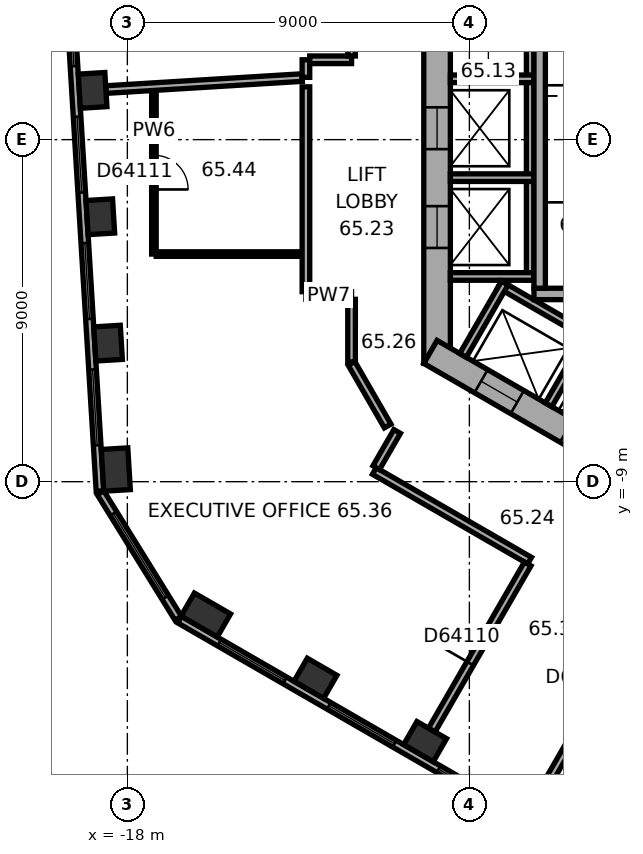
"""IFC4 building model, lengths in metres.
Left out: names, types, materials, properties, quantities, classifications, styles, units other than length and angle.
Written with IfcOpenShell. Run it as: python <this file> out.ifc"""

import sys

from ifc_helpers import new_model, si_unit, direction, frame, frame_2d, origin, origin_2d, place, context, subcontext, project, spatial, rectangle, extrude, element, fill, save


model = new_model("IFC4")
c1 = context("Model", 3, precision=1e-05, world=origin(), true_north=direction((0.0, 1.0)))
c2 = subcontext(c1, "Body", "Model", "MODEL_VIEW")
j1 = project(units=[si_unit("LENGTHUNIT", "METRE"), si_unit("PLANEANGLEUNIT", "RADIAN")], contexts=[c1])
p1 = place(None, origin())
s1 = spatial("IfcSite", under=j1, at=p1, CompositionType="ELEMENT")
p2 = place(p1, origin())
s2 = spatial("IfcBuilding", under=s1, at=p2, CompositionType="ELEMENT")
p3 = place(p2, frame((0.0, 0.0, 263.5)))
s3 = spatial("IfcBuildingStorey", under=s2, at=p3, CompositionType="ELEMENT", Elevation=263.5)
for number, where, z_axis, x_axis in (
    (1, (-18.914, 1.296, 0.0), (0.0, 0.0, 1.0), (0.061, -0.998, 0.0)),
    (2, (-18.711, -2.03, 0.0), (0.0, 0.0, 1.0), (0.061, -0.998, 0.0)),
    (3, (-18.508, -5.355, 0.0), (0.0, 0.0, 1.0), (0.061, -0.998, 0.0)),
):
    element("IfcColumn", number, at=place(p3, frame(where, z_axis=z_axis, x_axis=x_axis)), inside=s3, PredefinedType="COLUMN", context=c2, shape_type="SweptSolid", body=[
        extrude(rectangle(XDim=0.9, YDim=0.7, at=origin_2d()), origin(), (0.0, 0.0, 1.0), 3.7),
    ])
for number, where, z_axis, x_axis in (
    (4, (-18.304, -8.68, 0.0), (0.0, 0.0, 1.0), (0.061, -0.998, 0.0)),
    (5, (-15.936, -12.508, 0.0), (0.0, 0.0, 1.0), (0.866, -0.5, 0.0)),
):
    element("IfcColumn", number, at=place(p3, frame(where, z_axis=z_axis, x_axis=x_axis)), inside=s3, PredefinedType="COLUMN", context=c2, shape_type="SweptSolid", body=[
        extrude(rectangle(XDim=1.1, YDim=0.7, at=origin_2d()), origin(), (0.0, 0.0, 1.0), 3.7),
    ])
for number, where, z_axis, x_axis in (
    (6, (-13.05, -14.174, 0.0), (0.0, 0.0, 1.0), (0.866, -0.5, 0.0)),
    (7, (-10.165, -15.84, 0.0), (0.0, 0.0, 1.0), (0.866, -0.5, 0.0)),
):
    element("IfcColumn", number, at=place(p3, frame(where, z_axis=z_axis, x_axis=x_axis)), inside=s3, PredefinedType="COLUMN", context=c2, shape_type="SweptSolid", body=[
        extrude(rectangle(XDim=0.9, YDim=0.7, at=origin_2d()), origin(), (0.0, 0.0, 1.0), 3.7),
    ])
p4 = place(p3, frame((-9.85, 5.889, 0.0), z_axis=(0.0, 0.0, 1.0), x_axis=(0.0, -1.0, 0.0)))
e8 = element("IfcWall", 8, at=p4, inside=s3, PredefinedType="SHEAR", context=c2, shape_type="SweptSolid", body=[
    extrude(rectangle(XDim=11.778, YDim=0.7, at=frame_2d((5.889, 0.0))), origin(), (0.0, 0.0, 1.0), 3.7),
])
p5 = place(p4, frame((5.039, 0.0, 0.0)))
e9 = element("IfcOpeningElement", 9, at=p5, cuts=e8, PredefinedType="OPENING", context=c2, shape_type="SweptSolid", body=[
    extrude(rectangle(XDim=1.1, YDim=2.1, at=frame_2d((0.55, 1.05))), frame((0.0, 0.36, 0.0), z_axis=(0.0, -1.0, 0.0), x_axis=(1.0, 0.0, 0.0)), (0.0, 0.0, 1.0), 0.72),
])
p6 = place(p4, frame((7.639, 0.0, 0.0)))
e10 = element("IfcOpeningElement", 10, at=p6, cuts=e8, PredefinedType="OPENING", context=c2, shape_type="SweptSolid", body=[
    extrude(rectangle(XDim=1.1, YDim=2.1, at=frame_2d((0.55, 1.05))), frame((0.0, 0.36, 0.0), z_axis=(0.0, -1.0, 0.0), x_axis=(1.0, 0.0, 0.0)), (0.0, 0.0, 1.0), 0.72),
])
p7 = place(p3, frame((-10.025, -5.586, 0.0), z_axis=(0.0, 0.0, 1.0), x_axis=(0.866026453023, -0.499998182661, 0.0)))
e11 = element("IfcWall", 11, at=p7, inside=s3, PredefinedType="SHEAR", context=c2, shape_type="SweptSolid", body=[
    extrude(rectangle(XDim=11.778, YDim=0.7, at=frame_2d((5.889, 0.0))), origin(), (0.0, 0.0, 1.0), 3.7),
])
p8 = place(p7, frame((6.089, 0.0, 0.0)))
e12 = element("IfcOpeningElement", 12, at=p8, cuts=e11, PredefinedType="OPENING", context=c2, shape_type="SweptSolid", body=[
    extrude(rectangle(XDim=1.5, YDim=2.1, at=frame_2d((0.75, 1.05))), frame((0.0, 0.36, 0.0), z_axis=(0.0, -1.0, 0.0), x_axis=(1.0, 0.0, 0.0)), (0.0, 0.0, 1.0), 0.72),
])
p9 = place(p7, frame((1.539, 0.0, 0.0)))
e13 = element("IfcOpeningElement", 13, at=p9, cuts=e11, PredefinedType="OPENING", context=c2, shape_type="SweptSolid", body=[
    extrude(rectangle(XDim=1.1, YDim=2.1, at=frame_2d((0.55, 1.05))), frame((0.0, 0.36, 0.0), z_axis=(0.0, -1.0, 0.0), x_axis=(1.0, 0.0, 0.0)), (0.0, 0.0, 1.0), 0.72),
])
p10 = place(p7, frame((4.139, 0.0, 0.0)))
e14 = element("IfcOpeningElement", 14, at=p10, cuts=e11, PredefinedType="OPENING", context=c2, shape_type="SweptSolid", body=[
    extrude(rectangle(XDim=1.1, YDim=2.1, at=frame_2d((0.55, 1.05))), frame((0.0, 0.36, 0.0), z_axis=(0.0, -1.0, 0.0), x_axis=(1.0, 0.0, 0.0)), (0.0, 0.0, 1.0), 0.72),
])
p11 = place(p3, frame((-19.803, 8.454, 0.0), z_axis=(0.0, 0.0, 1.0), x_axis=(0.061036717565, -0.998135521414, 0.0)))
e15 = element("IfcWall", 15, at=p11, inside=s3, PredefinedType="STANDARD", context=c2, shape_type="SweptSolid", body=[
    extrude(rectangle(XDim=17.731, YDim=0.2, at=frame_2d((8.866, 0.0))), origin(), (0.0, 0.0, 1.0), 3.7),
])
p12 = place(p11, frame((1.202, 0.0, 0.9)))
e16 = element("IfcOpeningElement", 16, at=p12, cuts=e15, PredefinedType="OPENING", context=c2, shape_type="SweptSolid", body=[
    extrude(rectangle(XDim=2.0, YDim=2.0, at=frame_2d((1.0, 1.0))), frame((0.0, 0.11, 0.0), z_axis=(0.0, -1.0, 0.0), x_axis=(1.0, 0.0, 0.0)), (0.0, 0.0, 1.0), 0.22),
])
p13 = place(p11, frame((4.533, 0.0, 0.9)))
e17 = element("IfcOpeningElement", 17, at=p13, cuts=e15, PredefinedType="OPENING", context=c2, shape_type="SweptSolid", body=[
    extrude(rectangle(XDim=2.0, YDim=2.0, at=frame_2d((1.0, 1.0))), frame((0.0, 0.11, 0.0), z_axis=(0.0, -1.0, 0.0), x_axis=(1.0, 0.0, 0.0)), (0.0, 0.0, 1.0), 0.22),
])
p14 = place(p11, frame((7.865, 0.0, 0.9)))
e18 = element("IfcOpeningElement", 18, at=p14, cuts=e15, PredefinedType="OPENING", context=c2, shape_type="SweptSolid", body=[
    extrude(rectangle(XDim=2.0, YDim=2.0, at=frame_2d((1.0, 1.0))), frame((0.0, 0.11, 0.0), z_axis=(0.0, -1.0, 0.0), x_axis=(1.0, 0.0, 0.0)), (0.0, 0.0, 1.0), 0.22),
])
p15 = place(p11, frame((11.197, 0.0, 0.9)))
e19 = element("IfcOpeningElement", 19, at=p15, cuts=e15, PredefinedType="OPENING", context=c2, shape_type="SweptSolid", body=[
    extrude(rectangle(XDim=2.0, YDim=2.0, at=frame_2d((1.0, 1.0))), frame((0.0, 0.11, 0.0), z_axis=(0.0, -1.0, 0.0), x_axis=(1.0, 0.0, 0.0)), (0.0, 0.0, 1.0), 0.22),
])
p16 = place(p11, frame((14.528, 0.0, 0.9)))
e20 = element("IfcOpeningElement", 20, at=p16, cuts=e15, PredefinedType="OPENING", context=c2, shape_type="SweptSolid", body=[
    extrude(rectangle(XDim=2.0, YDim=2.0, at=frame_2d((1.0, 1.0))), frame((0.0, 0.11, 0.0), z_axis=(0.0, -1.0, 0.0), x_axis=(1.0, 0.0, 0.0)), (0.0, 0.0, 1.0), 0.22),
])
p17 = place(p3, frame((-18.706, -9.291, 0.0), z_axis=(0.0, 0.0, 1.0), x_axis=(0.526209683648, -0.850354848775, 0.0)))
e21 = element("IfcWall", 21, at=p17, inside=s3, PredefinedType="STANDARD", context=c2, shape_type="SweptSolid", body=[
    extrude(rectangle(XDim=3.886, YDim=0.2, at=frame_2d((1.943, 0.0))), origin(), (0.0, 0.0, 1.0), 3.7),
])
p18 = place(p17, frame((0.643, 0.0, 0.9)))
e22 = element("IfcOpeningElement", 22, at=p18, cuts=e21, PredefinedType="OPENING", context=c2, shape_type="SweptSolid", body=[
    extrude(rectangle(XDim=2.6, YDim=2.0, at=frame_2d((1.3, 1.0))), frame((0.0, 0.11, 0.0), z_axis=(0.0, -1.0, 0.0), x_axis=(1.0, 0.0, 0.0)), (0.0, 0.0, 1.0), 0.22),
])
p19 = place(p3, frame((-16.626, -12.629, 0.0), z_axis=(0.0, 0.0, 1.0), x_axis=(0.866026460444, -0.499998169808, 0.0)))
e23 = element("IfcWall", 23, at=p19, inside=s3, PredefinedType="STANDARD", context=c2, shape_type="SweptSolid", body=[
    extrude(rectangle(XDim=17.731, YDim=0.2, at=frame_2d((8.866, 0.0))), origin(), (0.0, 0.0, 1.0), 3.7),
])
p20 = place(p19, frame((1.203, 0.0, 0.9)))
e24 = element("IfcOpeningElement", 24, at=p20, cuts=e23, PredefinedType="OPENING", context=c2, shape_type="SweptSolid", body=[
    extrude(rectangle(XDim=2.0, YDim=2.0, at=frame_2d((1.0, 1.0))), frame((0.0, 0.11, 0.0), z_axis=(0.0, -1.0, 0.0), x_axis=(1.0, 0.0, 0.0)), (0.0, 0.0, 1.0), 0.22),
])
p21 = place(p19, frame((4.535, 0.0, 0.9)))
e25 = element("IfcOpeningElement", 25, at=p21, cuts=e23, PredefinedType="OPENING", context=c2, shape_type="SweptSolid", body=[
    extrude(rectangle(XDim=2.0, YDim=2.0, at=frame_2d((1.0, 1.0))), frame((0.0, 0.11, 0.0), z_axis=(0.0, -1.0, 0.0), x_axis=(1.0, 0.0, 0.0)), (0.0, 0.0, 1.0), 0.22),
])
p22 = place(p19, frame((7.867, 0.0, 0.9)))
e26 = element("IfcOpeningElement", 26, at=p22, cuts=e23, PredefinedType="OPENING", context=c2, shape_type="SweptSolid", body=[
    extrude(rectangle(XDim=2.0, YDim=2.0, at=frame_2d((1.0, 1.0))), frame((0.0, 0.11, 0.0), z_axis=(0.0, -1.0, 0.0), x_axis=(1.0, 0.0, 0.0)), (0.0, 0.0, 1.0), 0.22),
])
p23 = place(p19, frame((11.198, 0.0, 0.9)))
e27 = element("IfcOpeningElement", 27, at=p23, cuts=e23, PredefinedType="OPENING", context=c2, shape_type="SweptSolid", body=[
    extrude(rectangle(XDim=2.0, YDim=2.0, at=frame_2d((1.0, 1.0))), frame((0.0, 0.11, 0.0), z_axis=(0.0, -1.0, 0.0), x_axis=(1.0, 0.0, 0.0)), (0.0, 0.0, 1.0), 0.22),
])
p24 = place(p19, frame((14.53, 0.0, 0.9)))
e28 = element("IfcOpeningElement", 28, at=p24, cuts=e23, PredefinedType="OPENING", context=c2, shape_type="SweptSolid", body=[
    extrude(rectangle(XDim=2.0, YDim=2.0, at=frame_2d((1.0, 1.0))), frame((0.0, 0.11, 0.0), z_axis=(0.0, -1.0, 0.0), x_axis=(1.0, 0.0, 0.0)), (0.0, 0.0, 1.0), 0.22),
])
p25 = place(p3, frame((-7.4, 4.3, 0.0), z_axis=(0.0, 0.0, 1.0), x_axis=(0.0, -1.0, 0.0)))
e29 = element("IfcWall", 29, at=p25, inside=s3, PredefinedType="PARTITIONING", context=c2, shape_type="SweptSolid", body=[
    extrude(rectangle(XDim=8.0, YDim=0.2, at=frame_2d((4.0, 0.0))), origin(), (0.0, 0.0, 1.0), 3.42),
])
for number, where, z_axis, x_axis in (
    (30, (-7.3, 1.6, 0.0), (0.0, 0.0, 1.0), (-1.0, 0.0, 0.0)),
    (31, (-7.3, -1.0, 0.0), (0.0, 0.0, 1.0), (-1.0, 0.0, 0.0)),
    (32, (-7.3, -3.6, 0.0), (0.0, 0.0, 1.0), (-1.0, 0.0, 0.0)),
):
    element("IfcWall", number, at=place(p3, frame(where, z_axis=z_axis, x_axis=x_axis)), inside=s3, PredefinedType="PARTITIONING", context=c2, shape_type="SweptSolid", body=[
        extrude(rectangle(XDim=2.2, YDim=0.2, at=frame_2d((1.1, 0.0))), origin(), (0.0, 0.0, 1.0), 3.42),
    ])
p26 = place(p3, frame((-8.203, -3.809, 0.0), z_axis=(0.0, 0.0, 1.0), x_axis=(0.866028230842, -0.499995103361, 0.0)))
e33 = element("IfcWall", 33, at=p26, inside=s3, PredefinedType="PARTITIONING", context=c2, shape_type="SweptSolid", body=[
    extrude(rectangle(XDim=5.4, YDim=0.2, at=frame_2d((2.7, 0.0))), origin(), (0.0, 0.0, 1.0), 3.42),
])
for number, where, z_axis, x_axis in (
    (34, (-8.067, -3.772, 0.0), (0.0, 0.0, 1.0), (-0.5, -0.866, 0.0)),
    (35, (-5.815, -5.072, 0.0), (0.0, 0.0, 1.0), (-0.5, -0.866, 0.0)),
):
    element("IfcWall", number, at=place(p3, frame(where, z_axis=z_axis, x_axis=x_axis)), inside=s3, PredefinedType="PARTITIONING", context=c2, shape_type="SweptSolid", body=[
        extrude(rectangle(XDim=2.2, YDim=0.2, at=frame_2d((1.1, 0.0))), origin(), (0.0, 0.0, 1.0), 3.42),
    ])
p27 = place(p3, frame((-2.6, -4.06, 0.0), z_axis=(0.0, 0.0, 1.0), x_axis=(-1.0, 0.0, 0.0)))
e36 = element("IfcWall", 36, at=p27, inside=s3, PredefinedType="SHEAR", context=c2, shape_type="SweptSolid", body=[
    extrude(rectangle(XDim=4.7, YDim=0.3, at=frame_2d((2.35, 0.0))), origin(), (0.0, 0.0, 1.0), 3.42),
])
p28 = place(p3, frame((-7.15, 3.15, 0.0), z_axis=(0.0, 0.0, 1.0), x_axis=(0.0, -1.0, 0.0)))
e37 = element("IfcWall", 37, at=p28, inside=s3, PredefinedType="SHEAR", context=c2, shape_type="SweptSolid", body=[
    extrude(rectangle(XDim=7.06, YDim=0.3, at=frame_2d((3.53, 0.0))), origin(), (0.0, 0.0, 1.0), 3.42),
])
p29 = place(p3, frame((-18.565, 1.317, 0.0), z_axis=(0.0, 0.0, 1.0), x_axis=(0.998136844425, 0.061015078472, 0.0)))
e38 = element("IfcWall", 38, at=p29, inside=s3, PredefinedType="PARTITIONING", context=c2, shape_type="SweptSolid", body=[
    extrude(rectangle(XDim=5.174, YDim=0.2, at=frame_2d((2.587, 0.0))), origin(), (0.0, 0.0, 1.0), 2.87),
])
p30 = place(p3, frame((-17.301, -3.011, 0.0), z_axis=(0.0, 0.0, 1.0), x_axis=(0.0, 1.0, 0.0)))
e39 = element("IfcWall", 39, at=p30, inside=s3, PredefinedType="PARTITIONING", context=c2, shape_type="SweptSolid", body=[
    extrude(rectangle(XDim=4.3, YDim=0.12, at=frame_2d((2.15, 0.0))), origin(), (0.0, 0.0, 1.0), 3.42),
])
p31 = place(p30, frame((1.7, 0.0, 0.0)))
e40 = element("IfcOpeningElement", 40, at=p31, cuts=e39, PredefinedType="OPENING", context=c2, shape_type="SweptSolid", body=[
    extrude(rectangle(XDim=0.9, YDim=2.1, at=frame_2d((0.45, 1.05))), frame((0.0, 0.07, 0.0), z_axis=(0.0, -1.0, 0.0), x_axis=(1.0, 0.0, 0.0)), (0.0, 0.0, 1.0), 0.14),
])
p32 = place(p3, frame((-13.401, -3.011, 0.0), z_axis=(0.0, 0.0, 1.0), x_axis=(-1.0, 0.0, 0.0)))
e41 = element("IfcWall", 41, at=p32, inside=s3, PredefinedType="PARTITIONING", context=c2, shape_type="SweptSolid", body=[
    extrude(rectangle(XDim=3.84, YDim=0.12, at=frame_2d((1.92, 0.0))), origin(), (0.0, 0.0, 1.0), 3.42),
])
p33 = place(p3, frame((-13.301, -4.101, 0.0), z_axis=(0.0, 0.0, 1.0), x_axis=(1.0, 0.0, 0.0)))
e42 = element("IfcWall", 42, at=p33, inside=s3, PredefinedType="PARTITIONING", context=c2, shape_type="SweptSolid", body=[
    extrude(rectangle(XDim=1.201, YDim=0.2, at=frame_2d((0.601, 0.0))), origin(), (0.0, 0.0, 1.0), 3.42),
])
p34 = place(p3, frame((-13.301, 1.389, 0.0), z_axis=(0.0, 0.0, 1.0), x_axis=(0.0, -1.0, 0.0)))
e43 = element("IfcWall", 43, at=p34, inside=s3, PredefinedType="PARTITIONING", context=c2, shape_type="SweptSolid", body=[
    extrude(rectangle(XDim=5.39, YDim=0.2, at=frame_2d((2.695, 0.0))), origin(), (0.0, 0.0, 1.0), 3.42),
])
p35 = place(p3, frame((-13.301, 2.101, 0.0), z_axis=(0.0, 0.0, 1.0), x_axis=(0.0, -1.0, 0.0)))
e44 = element("IfcWall", 44, at=p35, inside=s3, PredefinedType="PARTITIONING", context=c2, shape_type="SweptSolid", body=[
    extrude(rectangle(XDim=0.462, YDim=0.2, at=frame_2d((0.231, 0.0))), origin(), (0.0, 0.0, 1.0), 3.42),
])
p36 = place(p3, frame((-12.1, -5.889, 0.0), z_axis=(0.0, 0.0, 1.0), x_axis=(0.500063520245, -0.865988727248, 0.0)))
e45 = element("IfcWall", 45, at=p36, inside=s3, PredefinedType="PARTITIONING", context=c2, shape_type="SweptSolid", body=[
    extrude(rectangle(XDim=1.9, YDim=0.2, at=frame_2d((0.95, 0.0))), origin(), (0.0, 0.0, 1.0), 3.42),
])
p37 = place(p3, frame((-12.1, -4.201, 0.0), z_axis=(0.0, 0.0, 1.0), x_axis=(0.0, -1.0, 0.0)))
e46 = element("IfcWall", 46, at=p37, inside=s3, PredefinedType="PARTITIONING", context=c2, shape_type="SweptSolid", body=[
    extrude(rectangle(XDim=1.648, YDim=0.2, at=frame_2d((0.824, 0.0))), origin(), (0.0, 0.0, 1.0), 3.42),
])
p38 = place(p3, frame((-12.1, 2.101, 0.0), z_axis=(0.0, 0.0, 1.0), x_axis=(-1.0, 0.0, 0.0)))
e47 = element("IfcWall", 47, at=p38, inside=s3, PredefinedType="PARTITIONING", context=c2, shape_type="SweptSolid", body=[
    extrude(rectangle(XDim=1.101, YDim=0.2, at=frame_2d((0.55, 0.0))), origin(), (0.0, 0.0, 1.0), 3.42),
])
p39 = place(p3, frame((-12.1, 5.889, 0.0), z_axis=(0.0, 0.0, 1.0), x_axis=(0.0, -1.0, 0.0)))
e48 = element("IfcWall", 48, at=p39, inside=s3, PredefinedType="PARTITIONING", context=c2, shape_type="SweptSolid", body=[
    extrude(rectangle(XDim=3.688, YDim=0.2, at=frame_2d((1.844, 0.0))), origin(), (0.0, 0.0, 1.0), 3.42),
])
p40 = place(p39, frame((1.763, 0.0, 0.0)))
e49 = element("IfcOpeningElement", 49, at=p40, cuts=e48, PredefinedType="OPENING", context=c2, shape_type="SweptSolid", body=[
    extrude(rectangle(XDim=1.0, YDim=2.1, at=frame_2d((0.5, 1.05))), frame((0.0, 0.11, 0.0), z_axis=(0.0, -1.0, 0.0), x_axis=(1.0, 0.0, 0.0)), (0.0, 0.0, 1.0), 0.22),
])
p41 = place(p3, frame((-11.501, -8.719, 0.0), z_axis=(0.0, 0.0, 1.0), x_axis=(0.866024434742, -0.500001678427, 0.0)))
e50 = element("IfcWall", 50, at=p41, inside=s3, PredefinedType="PARTITIONING", context=c2, shape_type="SweptSolid", body=[
    extrude(rectangle(XDim=4.718, YDim=0.2, at=frame_2d((2.359, 0.0))), origin(), (0.0, 0.0, 1.0), 3.42),
])
p42 = place(p3, frame((-10.901, -7.678, 0.0), z_axis=(0.0, 0.0, 1.0), x_axis=(-0.500074377092, -0.865982457891, 0.0)))
e51 = element("IfcWall", 51, at=p42, inside=s3, PredefinedType="PARTITIONING", context=c2, shape_type="SweptSolid", body=[
    extrude(rectangle(XDim=1.101, YDim=0.2, at=frame_2d((0.55, 0.0))), origin(), (0.0, 0.0, 1.0), 3.42),
])
p43 = place(p3, frame((-9.99, -15.537, 0.0), z_axis=(0.0, 0.0, 1.0), x_axis=(0.499966611936, 0.866044679534, 0.0)))
e52 = element("IfcWall", 52, at=p43, inside=s3, PredefinedType="PARTITIONING", context=c2, shape_type="SweptSolid", body=[
    extrude(rectangle(XDim=5.049, YDim=0.2, at=frame_2d((2.524, 0.0))), origin(), (0.0, 0.0, 1.0), 2.87),
])
p44 = place(p43, frame((2.024, 0.0, 0.0)))
e53 = element("IfcOpeningElement", 53, at=p44, cuts=e52, PredefinedType="OPENING", context=c2, shape_type="SweptSolid", body=[
    extrude(rectangle(XDim=1.0, YDim=2.1, at=frame_2d((0.5, 1.05))), frame((0.0, 0.11, 0.0), z_axis=(0.0, -1.0, 0.0), x_axis=(1.0, 0.0, 0.0)), (0.0, 0.0, 1.0), 0.22),
])
p45 = place(p3, frame((-7.105, -17.202, 0.0), z_axis=(0.0, 0.0, 1.0), x_axis=(0.499988692146, 0.866031932279, 0.0)))
e54 = element("IfcWall", 54, at=p45, inside=s3, PredefinedType="PARTITIONING", context=c2, shape_type="SweptSolid", body=[
    extrude(rectangle(XDim=6.35, YDim=0.2, at=frame_2d((3.175, 0.0))), origin(), (0.0, 0.0, 1.0), 3.42),
])
p46 = place(p45, frame((2.675, 0.0, 0.0)))
e55 = element("IfcOpeningElement", 55, at=p46, cuts=e54, PredefinedType="OPENING", context=c2, shape_type="SweptSolid", body=[
    extrude(rectangle(XDim=1.0, YDim=2.1, at=frame_2d((0.5, 1.05))), frame((0.0, 0.11, 0.0), z_axis=(0.0, -1.0, 0.0), x_axis=(1.0, 0.0, 0.0)), (0.0, 0.0, 1.0), 0.22),
])
p47 = place(p13, origin())
e56 = element("IfcWindow", 56, at=p47, inside=s3, PartitioningType="SINGLE_PANEL", PredefinedType="WINDOW", context=c2, shape_type="SweptSolid", body=[
    extrude(rectangle(XDim=2.0, YDim=2.0, at=frame_2d((1.0, 1.0))), frame((0.0, 0.03, 0.0), z_axis=(0.0, -1.0, 0.0), x_axis=(1.0, 0.0, 0.0)), (0.0, 0.0, 1.0), 0.06),
])
fill(e17, e56)
p48 = place(p14, origin())
e57 = element("IfcWindow", 57, at=p48, inside=s3, PartitioningType="SINGLE_PANEL", PredefinedType="WINDOW", context=c2, shape_type="SweptSolid", body=[
    extrude(rectangle(XDim=2.0, YDim=2.0, at=frame_2d((1.0, 1.0))), frame((0.0, 0.03, 0.0), z_axis=(0.0, -1.0, 0.0), x_axis=(1.0, 0.0, 0.0)), (0.0, 0.0, 1.0), 0.06),
])
fill(e18, e57)
p49 = place(p15, origin())
e58 = element("IfcWindow", 58, at=p49, inside=s3, PartitioningType="SINGLE_PANEL", PredefinedType="WINDOW", context=c2, shape_type="SweptSolid", body=[
    extrude(rectangle(XDim=2.0, YDim=2.0, at=frame_2d((1.0, 1.0))), frame((0.0, 0.03, 0.0), z_axis=(0.0, -1.0, 0.0), x_axis=(1.0, 0.0, 0.0)), (0.0, 0.0, 1.0), 0.06),
])
fill(e19, e58)
p50 = place(p16, origin())
e59 = element("IfcWindow", 59, at=p50, inside=s3, PartitioningType="SINGLE_PANEL", PredefinedType="WINDOW", context=c2, shape_type="SweptSolid", body=[
    extrude(rectangle(XDim=2.0, YDim=2.0, at=frame_2d((1.0, 1.0))), frame((0.0, 0.03, 0.0), z_axis=(0.0, -1.0, 0.0), x_axis=(1.0, 0.0, 0.0)), (0.0, 0.0, 1.0), 0.06),
])
fill(e20, e59)
p51 = place(p18, origin())
e60 = element("IfcWindow", 60, at=p51, inside=s3, PartitioningType="SINGLE_PANEL", PredefinedType="WINDOW", context=c2, shape_type="SweptSolid", body=[
    extrude(rectangle(XDim=2.6, YDim=2.0, at=frame_2d((1.3, 1.0))), frame((0.0, 0.03, 0.0), z_axis=(0.0, -1.0, 0.0), x_axis=(1.0, 0.0, 0.0)), (0.0, 0.0, 1.0), 0.06),
])
fill(e22, e60)
p52 = place(p20, origin())
e61 = element("IfcWindow", 61, at=p52, inside=s3, PartitioningType="SINGLE_PANEL", PredefinedType="WINDOW", context=c2, shape_type="SweptSolid", body=[
    extrude(rectangle(XDim=2.0, YDim=2.0, at=frame_2d((1.0, 1.0))), frame((0.0, 0.03, 0.0), z_axis=(0.0, -1.0, 0.0), x_axis=(1.0, 0.0, 0.0)), (0.0, 0.0, 1.0), 0.06),
])
fill(e24, e61)
p53 = place(p21, origin())
e62 = element("IfcWindow", 62, at=p53, inside=s3, PartitioningType="SINGLE_PANEL", PredefinedType="WINDOW", context=c2, shape_type="SweptSolid", body=[
    extrude(rectangle(XDim=2.0, YDim=2.0, at=frame_2d((1.0, 1.0))), frame((0.0, 0.03, 0.0), z_axis=(0.0, -1.0, 0.0), x_axis=(1.0, 0.0, 0.0)), (0.0, 0.0, 1.0), 0.06),
])
fill(e25, e62)
p54 = place(p22, origin())
e63 = element("IfcWindow", 63, at=p54, inside=s3, PartitioningType="SINGLE_PANEL", PredefinedType="WINDOW", context=c2, shape_type="SweptSolid", body=[
    extrude(rectangle(XDim=2.0, YDim=2.0, at=frame_2d((1.0, 1.0))), frame((0.0, 0.03, 0.0), z_axis=(0.0, -1.0, 0.0), x_axis=(1.0, 0.0, 0.0)), (0.0, 0.0, 1.0), 0.06),
])
fill(e26, e63)
p55 = place(p5, origin())
e64 = element("IfcDoor", 64, at=p55, inside=s3, OperationType="DOUBLE_DOOR_SLIDING", PredefinedType="DOOR", context=c2, shape_type="SweptSolid", body=[
    extrude(rectangle(XDim=1.1, YDim=2.1, at=frame_2d((0.55, 1.05))), frame((0.0, 0.025, 0.0), z_axis=(0.0, -1.0, 0.0), x_axis=(1.0, 0.0, 0.0)), (0.0, 0.0, 1.0), 0.05),
])
fill(e9, e64)
p56 = place(p6, origin())
e65 = element("IfcDoor", 65, at=p56, inside=s3, OperationType="DOUBLE_DOOR_SLIDING", PredefinedType="DOOR", context=c2, shape_type="SweptSolid", body=[
    extrude(rectangle(XDim=1.1, YDim=2.1, at=frame_2d((0.55, 1.05))), frame((0.0, 0.025, 0.0), z_axis=(0.0, -1.0, 0.0), x_axis=(1.0, 0.0, 0.0)), (0.0, 0.0, 1.0), 0.05),
])
fill(e10, e65)
p57 = place(p9, origin())
e66 = element("IfcDoor", 66, at=p57, inside=s3, OperationType="DOUBLE_DOOR_SLIDING", PredefinedType="DOOR", context=c2, shape_type="SweptSolid", body=[
    extrude(rectangle(XDim=1.1, YDim=2.1, at=frame_2d((0.55, 1.05))), frame((0.0, 0.025, 0.0), z_axis=(0.0, -1.0, 0.0), x_axis=(1.0, 0.0, 0.0)), (0.0, 0.0, 1.0), 0.05),
])
fill(e13, e66)
p58 = place(p44, origin())
e67 = element("IfcDoor", 67, at=p58, inside=s3, OperationType="SINGLE_SWING_LEFT", PredefinedType="DOOR", context=c2, shape_type="SweptSolid", body=[
    extrude(rectangle(XDim=1.0, YDim=2.1, at=frame_2d((0.5, 1.05))), frame((0.0, 0.025, 0.0), z_axis=(0.0, -1.0, 0.0), x_axis=(1.0, 0.0, 0.0)), (0.0, 0.0, 1.0), 0.05),
])
fill(e53, e67)
p59 = place(p31, origin())
e68 = element("IfcDoor", 68, at=p59, inside=s3, OperationType="SINGLE_SWING_LEFT", PredefinedType="DOOR", context=c2, shape_type="SweptSolid", body=[
    extrude(rectangle(XDim=0.9, YDim=2.1, at=frame_2d((0.45, 1.05))), frame((0.0, 0.025, 0.0), z_axis=(0.0, -1.0, 0.0), x_axis=(1.0, 0.0, 0.0)), (0.0, 0.0, 1.0), 0.05),
])
fill(e40, e68)
save(model, sys.argv[1])
